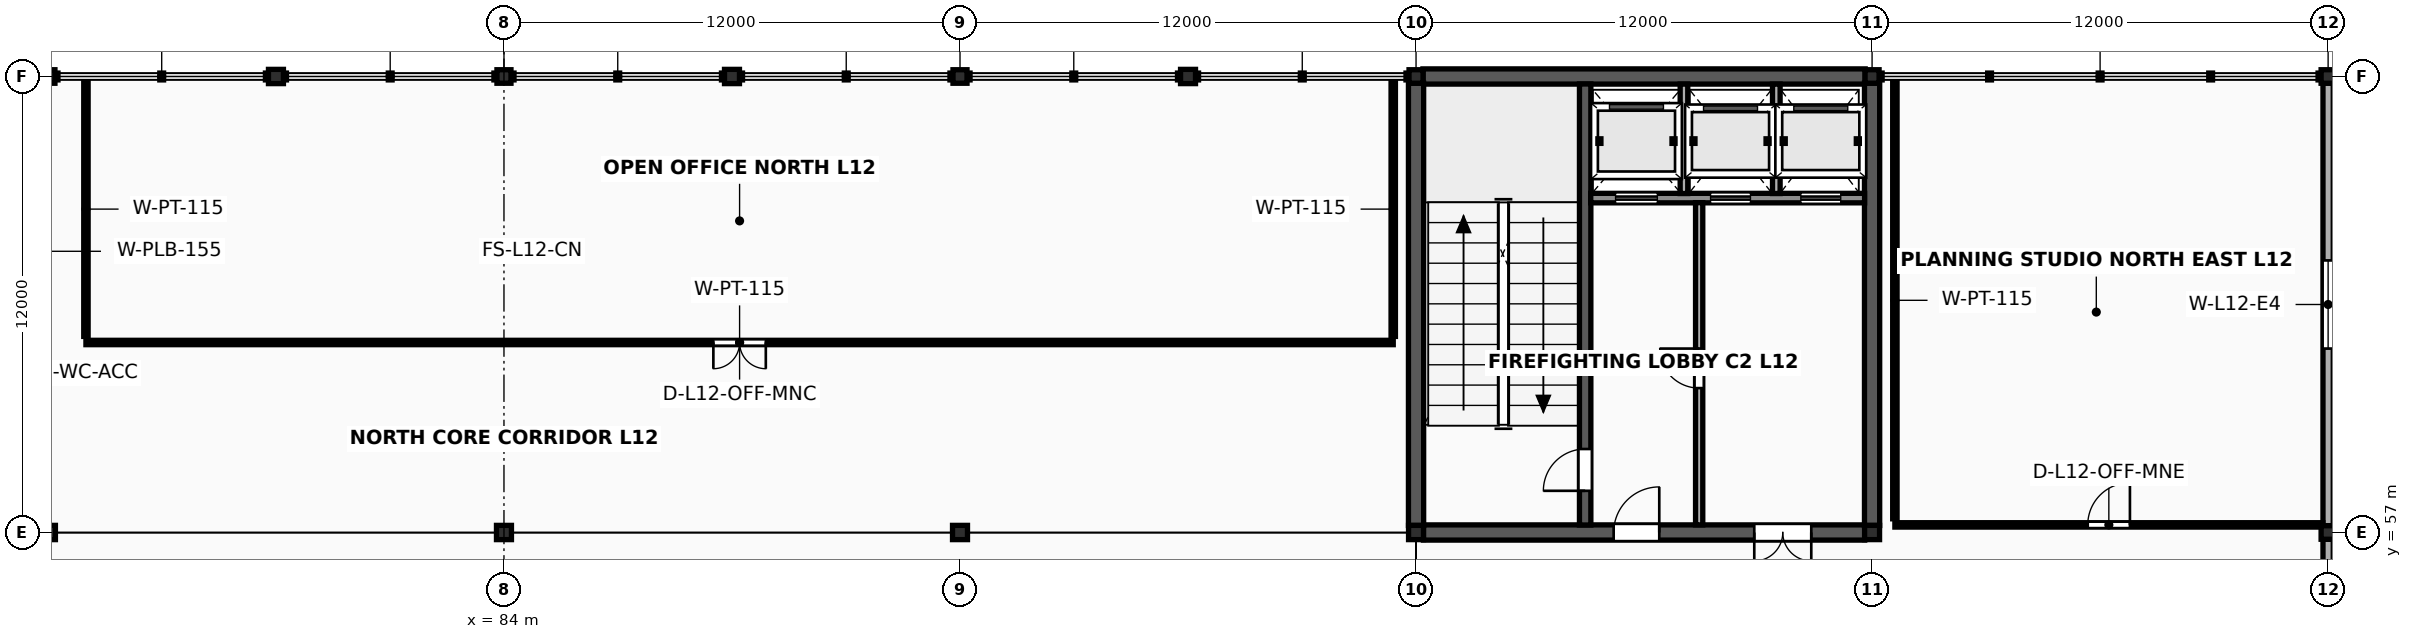
"""IFC4 building model, lengths in metres.
Left out: names, types, materials, properties, quantities, classifications, styles, units other than length and angle.
Written with IfcOpenShell. Run it as: python <this file> out.ifc"""

import sys

from ifc_helpers import new_model, si_unit, direction, frame, frame_2d, origin, origin_2d, place, context, subcontext, project, spatial, rectangle, i_section, extrude, element, fill, save


model = new_model("IFC4")
c1 = context("Model", 3, precision=1e-05, world=origin(), true_north=direction((0.0, 1.0)))
c2 = subcontext(c1, "Body", "Model", "MODEL_VIEW")
j1 = project(units=[si_unit("LENGTHUNIT", "METRE"), si_unit("PLANEANGLEUNIT", "RADIAN")], contexts=[c1])
p1 = place(None, origin())
s1 = spatial("IfcSite", under=j1, at=p1, CompositionType="ELEMENT")
p2 = place(p1, origin())
s2 = spatial("IfcBuilding", under=s1, at=p2, CompositionType="ELEMENT")
p3 = place(p2, frame((0.0, 0.0, 49.6)))
s3 = spatial("IfcBuildingStorey", under=s2, at=p3, CompositionType="ELEMENT", Elevation=49.6)
p4 = place(p3, frame((72.0, 57.0, 0.0), z_axis=(0.0, 0.0, 1.0), x_axis=(1.0, 0.0, 0.0)))
e1 = element("IfcColumn", 1, at=p4, inside=s3, PredefinedType="COLUMN", context=c2, shape_type="SweptSolid", body=[
    extrude(i_section(OverallWidth=0.394, OverallDepth=0.375, WebThickness=0.017, FlangeThickness=0.028, FilletRadius=0.018, at=origin_2d()), origin(), (0.0, 0.0, 1.0), 4.0),
])
p5 = place(p3, frame((72.0, 69.0, 0.0), z_axis=(0.0, 0.0, 1.0), x_axis=(1.0, 0.0, 0.0)))
e2 = element("IfcColumn", 2, at=p5, inside=s3, PredefinedType="COLUMN", context=c2, shape_type="SweptSolid", body=[
    extrude(i_section(OverallWidth=0.369, OverallDepth=0.356, WebThickness=0.011, FlangeThickness=0.018, FilletRadius=0.018, at=origin_2d()), origin(), (0.0, 0.0, 1.0), 4.0),
])
p6 = place(p3, frame((84.0, 57.0, 0.0), z_axis=(0.0, 0.0, 1.0), x_axis=(1.0, 0.0, 0.0)))
e3 = element("IfcColumn", 3, at=p6, inside=s3, PredefinedType="COLUMN", context=c2, shape_type="SweptSolid", body=[
    extrude(i_section(OverallWidth=0.394, OverallDepth=0.375, WebThickness=0.017, FlangeThickness=0.028, FilletRadius=0.018, at=origin_2d()), origin(), (0.0, 0.0, 1.0), 4.0),
])
p7 = place(p3, frame((84.0, 69.0, 0.0), z_axis=(0.0, 0.0, 1.0), x_axis=(1.0, 0.0, 0.0)))
e4 = element("IfcColumn", 4, at=p7, inside=s3, PredefinedType="COLUMN", context=c2, shape_type="SweptSolid", body=[
    extrude(i_section(OverallWidth=0.369, OverallDepth=0.356, WebThickness=0.011, FlangeThickness=0.018, FilletRadius=0.018, at=origin_2d()), origin(), (0.0, 0.0, 1.0), 4.0),
])
p8 = place(p3, frame((96.0, 57.0, 0.0), z_axis=(0.0, 0.0, 1.0), x_axis=(1.0, 0.0, 0.0)))
e5 = element("IfcColumn", 5, at=p8, inside=s3, PredefinedType="COLUMN", context=c2, shape_type="SweptSolid", body=[
    extrude(i_section(OverallWidth=0.394, OverallDepth=0.375, WebThickness=0.017, FlangeThickness=0.028, FilletRadius=0.018, at=origin_2d()), origin(), (0.0, 0.0, 1.0), 4.0),
])
p9 = place(p3, frame((96.0, 69.0, 0.0), z_axis=(0.0, 0.0, 1.0), x_axis=(1.0, 0.0, 0.0)))
e6 = element("IfcColumn", 6, at=p9, inside=s3, PredefinedType="COLUMN", context=c2, shape_type="SweptSolid", body=[
    extrude(i_section(OverallWidth=0.369, OverallDepth=0.356, WebThickness=0.011, FlangeThickness=0.018, FilletRadius=0.018, at=origin_2d()), origin(), (0.0, 0.0, 1.0), 4.0),
])
p10 = place(p3, frame((108.0, 57.0, 0.0), z_axis=(0.0, 0.0, 1.0), x_axis=(1.0, 0.0, 0.0)))
e7 = element("IfcColumn", 7, at=p10, inside=s3, PredefinedType="COLUMN", context=c2, shape_type="SweptSolid", body=[
    extrude(i_section(OverallWidth=0.394, OverallDepth=0.375, WebThickness=0.017, FlangeThickness=0.028, FilletRadius=0.018, at=origin_2d()), origin(), (0.0, 0.0, 1.0), 4.0),
])
p11 = place(p3, frame((108.0, 69.0, 0.0), z_axis=(0.0, 0.0, 1.0), x_axis=(1.0, 0.0, 0.0)))
e8 = element("IfcColumn", 8, at=p11, inside=s3, PredefinedType="COLUMN", context=c2, shape_type="SweptSolid", body=[
    extrude(i_section(OverallWidth=0.369, OverallDepth=0.356, WebThickness=0.011, FlangeThickness=0.018, FilletRadius=0.018, at=origin_2d()), origin(), (0.0, 0.0, 1.0), 4.0),
])
p12 = place(p3, frame((120.0, 57.0, 0.0), z_axis=(0.0, 0.0, 1.0), x_axis=(1.0, 0.0, 0.0)))
e9 = element("IfcColumn", 9, at=p12, inside=s3, PredefinedType="COLUMN", context=c2, shape_type="SweptSolid", body=[
    extrude(i_section(OverallWidth=0.394, OverallDepth=0.375, WebThickness=0.017, FlangeThickness=0.028, FilletRadius=0.018, at=origin_2d()), origin(), (0.0, 0.0, 1.0), 4.0),
])
for number, where, z_axis, x_axis in (
    (10, (120.0, 69.0, 0.0), (0.0, 0.0, 1.0), (1.0, 0.0, 0.0)),
    (11, (132.0, 57.0, 0.0), (0.0, 0.0, 1.0), (1.0, 0.0, 0.0)),
    (12, (132.0, 69.0, 0.0), (0.0, 0.0, 1.0), (1.0, 0.0, 0.0)),
):
    element("IfcColumn", number, at=place(p3, frame(where, z_axis=z_axis, x_axis=x_axis)), inside=s3, PredefinedType="COLUMN", context=c2, shape_type="SweptSolid", body=[
        extrude(i_section(OverallWidth=0.369, OverallDepth=0.356, WebThickness=0.011, FlangeThickness=0.018, FilletRadius=0.018, at=origin_2d()), origin(), (0.0, 0.0, 1.0), 4.0),
    ])
for number, where, z_axis, x_axis in (
    (13, (78.0, 69.0, 0.0), (0.0, 0.0, 1.0), (1.0, 0.0, 0.0)),
    (14, (90.0, 69.0, 0.0), (0.0, 0.0, 1.0), (1.0, 0.0, 0.0)),
    (15, (102.0, 69.0, 0.0), (0.0, 0.0, 1.0), (1.0, 0.0, 0.0)),
):
    element("IfcColumn", number, at=place(p3, frame(where, z_axis=z_axis, x_axis=x_axis)), inside=s3, PredefinedType="COLUMN", context=c2, shape_type="SweptSolid", body=[
        extrude(i_section(OverallWidth=0.394, OverallDepth=0.375, WebThickness=0.017, FlangeThickness=0.028, FilletRadius=0.018, at=origin_2d()), origin(), (0.0, 0.0, 1.0), 4.0),
    ])
p13 = place(p3, frame((108.194, 57.0, 0.0), z_axis=(0.0, 0.0, 1.0), x_axis=(1.0, 0.0, 0.0)))
e16 = element("IfcWall", 16, at=p13, inside=s3, PredefinedType="SHEAR", context=c2, shape_type="SweptSolid", body=[
    extrude(rectangle(XDim=11.612, YDim=0.4, at=frame_2d((5.806, 0.0))), origin(), (0.0, 0.0, 1.0), 3.848),
])
p14 = place(p13, frame((5.006, 0.0, 0.0)))
e17 = element("IfcOpeningElement", 17, at=p14, cuts=e16, PredefinedType="OPENING", context=c2, shape_type="SweptSolid", body=[
    extrude(rectangle(XDim=1.2, YDim=2.2, at=frame_2d((0.6, 1.1))), frame((0.0, 0.215, 0.0), z_axis=(0.0, -1.0, 0.0), x_axis=(1.0, 0.0, 0.0)), (0.0, 0.0, 1.0), 0.43),
])
p15 = place(p13, frame((8.706, 0.0, 0.0)))
e18 = element("IfcOpeningElement", 18, at=p15, cuts=e16, PredefinedType="OPENING", context=c2, shape_type="SweptSolid", body=[
    extrude(rectangle(XDim=1.5, YDim=2.25, at=frame_2d((0.75, 1.125))), frame((0.0, 0.215, 0.0), z_axis=(0.0, -1.0, 0.0), x_axis=(1.0, 0.0, 0.0)), (0.0, 0.0, 1.0), 0.43),
])
p16 = place(p3, frame((108.181, 69.0, 0.0), z_axis=(0.0, 0.0, 1.0), x_axis=(1.0, 0.0, 0.0)))
e19 = element("IfcWall", 19, at=p16, inside=s3, PredefinedType="SHEAR", context=c2, shape_type="SweptSolid", body=[
    extrude(rectangle(XDim=11.637, YDim=0.4, at=frame_2d((5.819, 0.0))), origin(), (0.0, 0.0, 1.0), 3.848),
])
for number, where, z_axis, x_axis in (
    (20, (108.0, 57.185, 0.0), (0.0, 0.0, 1.0), (0.0, 1.0, 0.0)),
    (21, (120.0, 57.185, 0.0), (0.0, 0.0, 1.0), (0.0, 1.0, 0.0)),
):
    element("IfcWall", number, at=place(p3, frame(where, z_axis=z_axis, x_axis=x_axis)), inside=s3, PredefinedType="SHEAR", context=c2, shape_type="SweptSolid", body=[
        extrude(rectangle(XDim=11.64, YDim=0.4, at=frame_2d((5.82, 0.0))), origin(), (0.0, 0.0, 1.0), 3.848),
    ])
p17 = place(p3, frame((112.45, 57.197, 0.0), z_axis=(0.0, 0.0, 1.0), x_axis=(0.0, 1.0, 0.0)))
e22 = element("IfcWall", 22, at=p17, inside=s3, PredefinedType="SHEAR", context=c2, shape_type="SweptSolid", body=[
    extrude(rectangle(XDim=11.606, YDim=0.3, at=frame_2d((5.803, 0.0))), origin(), (0.0, 0.0, 1.0), 3.848),
])
p18 = place(p17, frame((0.9, 0.0, 0.0)))
e23 = element("IfcOpeningElement", 23, at=p18, cuts=e22, PredefinedType="OPENING", context=c2, shape_type="SweptSolid", body=[
    extrude(rectangle(XDim=1.1, YDim=2.2, at=frame_2d((0.55, 1.1))), frame((0.0, 0.165, 0.0), z_axis=(0.0, -1.0, 0.0), x_axis=(1.0, 0.0, 0.0)), (0.0, 0.0, 1.0), 0.33),
])
p19 = place(p3, frame((112.597, 65.8, 0.0), z_axis=(0.0, 0.0, 1.0), x_axis=(1.0, 0.0, 0.0)))
e24 = element("IfcWall", 24, at=p19, inside=s3, PredefinedType="SOLIDWALL", context=c2, shape_type="SweptSolid", body=[
    extrude(rectangle(XDim=7.206, YDim=0.25, at=frame_2d((3.603, 0.0))), origin(), (0.0, 0.0, 1.0), 3.848),
])
p20 = place(p19, frame((0.653, 0.0, 0.0)))
e25 = element("IfcOpeningElement", 25, at=p20, cuts=e24, PredefinedType="OPENING", context=c2, shape_type="SweptSolid", body=[
    extrude(rectangle(XDim=1.1, YDim=2.24, at=frame_2d((0.55, 1.12))), frame((0.0, 0.14, 0.0), z_axis=(0.0, -1.0, 0.0), x_axis=(1.0, 0.0, 0.0)), (0.0, 0.0, 1.0), 0.28),
])
p21 = place(p19, frame((3.153, 0.0, 0.0)))
e26 = element("IfcOpeningElement", 26, at=p21, cuts=e24, PredefinedType="OPENING", context=c2, shape_type="SweptSolid", body=[
    extrude(rectangle(XDim=1.05, YDim=2.2, at=frame_2d((0.525, 1.1))), frame((0.0, 0.14, 0.0), z_axis=(0.0, -1.0, 0.0), x_axis=(1.0, 0.0, 0.0)), (0.0, 0.0, 1.0), 0.28),
])
p22 = place(p19, frame((5.528, 0.0, 0.0)))
e27 = element("IfcOpeningElement", 27, at=p22, cuts=e24, PredefinedType="OPENING", context=c2, shape_type="SweptSolid", body=[
    extrude(rectangle(XDim=1.05, YDim=2.2, at=frame_2d((0.525, 1.1))), frame((0.0, 0.14, 0.0), z_axis=(0.0, -1.0, 0.0), x_axis=(1.0, 0.0, 0.0)), (0.0, 0.0, 1.0), 0.28),
])
for number, where, z_axis, x_axis in (
    (28, (115.05, 65.92, 0.0), (0.0, 0.0, 1.0), (0.0, 1.0, 0.0)),
    (29, (117.48, 65.92, 0.0), (0.0, 0.0, 1.0), (0.0, 1.0, 0.0)),
):
    element("IfcWall", number, at=place(p3, frame(where, z_axis=z_axis, x_axis=x_axis)), inside=s3, PredefinedType="SOLIDWALL", context=c2, shape_type="SweptSolid", body=[
        extrude(rectangle(XDim=2.88, YDim=0.2, at=frame_2d((1.44, 0.0))), origin(), (0.0, 0.0, 1.0), 3.838),
    ])
p23 = place(p3, frame((115.45, 57.2, 0.0), z_axis=(0.0, 0.0, 1.0), x_axis=(0.0, 1.0, 0.0)))
e30 = element("IfcWall", 30, at=p23, inside=s3, PredefinedType="SOLIDWALL", context=c2, shape_type="SweptSolid", body=[
    extrude(rectangle(XDim=8.48, YDim=0.19, at=frame_2d((4.24, 0.0))), origin(), (0.0, 0.0, 1.0), 3.838),
])
p24 = place(p23, frame((3.6, 0.0, 0.0)))
e31 = element("IfcOpeningElement", 31, at=p24, cuts=e30, PredefinedType="OPENING", context=c2, shape_type="SweptSolid", body=[
    extrude(rectangle(XDim=1.04, YDim=2.18, at=frame_2d((0.52, 1.09))), frame((0.0, 0.11, 0.0), z_axis=(0.0, -1.0, 0.0), x_axis=(1.0, 0.0, 0.0)), (0.0, 0.0, 1.0), 0.22),
])
p25 = place(p3, frame((132.0, 45.176, 0.0), z_axis=(0.0, 0.0, 1.0), x_axis=(0.0, 1.0, 0.0)))
e32 = element("IfcWall", 32, at=p25, inside=s3, PredefinedType="SOLIDWALL", context=c2, shape_type="SweptSolid", body=[
    extrude(rectangle(XDim=11.648, YDim=0.27, at=frame_2d((5.824, 0.0))), origin(), (0.0, 0.0, 1.0), 3.301),
])
p26 = place(p25, frame((4.744, 0.0, 0.78)))
e33 = element("IfcOpeningElement", 33, at=p26, cuts=e32, PredefinedType="OPENING", context=c2, shape_type="SweptSolid", body=[
    extrude(rectangle(XDim=2.16, YDim=1.42, at=frame_2d((1.08, 0.71))), frame((0.0, 0.15, 0.0), z_axis=(0.0, -1.0, 0.0), x_axis=(1.0, 0.0, 0.0)), (0.0, 0.0, 1.0), 0.3),
])
p27 = place(p3, frame((132.0, 57.176, 0.0), z_axis=(0.0, 0.0, 1.0), x_axis=(0.0, 1.0, 0.0)))
e34 = element("IfcWall", 34, at=p27, inside=s3, PredefinedType="SOLIDWALL", context=c2, shape_type="SweptSolid", body=[
    extrude(rectangle(XDim=11.648, YDim=0.27, at=frame_2d((5.824, 0.0))), origin(), (0.0, 0.0, 1.0), 3.301),
])
p28 = place(p27, frame((4.664, 0.0, 0.78)))
e35 = element("IfcOpeningElement", 35, at=p28, cuts=e34, PredefinedType="OPENING", context=c2, shape_type="SweptSolid", body=[
    extrude(rectangle(XDim=2.32, YDim=1.42, at=frame_2d((1.16, 0.71))), frame((0.0, 0.15, 0.0), z_axis=(0.0, -1.0, 0.0), x_axis=(1.0, 0.0, 0.0)), (0.0, 0.0, 1.0), 0.3),
])
p29 = place(p3, frame((73.0, 62.0, 0.0), z_axis=(0.0, 0.0, 1.0), x_axis=(1.0, 0.0, 0.0)))
e36 = element("IfcWall", 36, at=p29, inside=s3, PredefinedType="PARTITIONING", context=c2, shape_type="SweptSolid", body=[
    extrude(rectangle(XDim=34.4, YDim=0.115, at=frame_2d((17.2, 0.0))), origin(), (0.0, 0.0, 1.0), 2.88),
])
p30 = place(p29, frame((16.51, 0.0, 0.0)))
e37 = element("IfcOpeningElement", 37, at=p30, cuts=e36, PredefinedType="OPENING", context=c2, shape_type="SweptSolid", body=[
    extrude(rectangle(XDim=1.38, YDim=2.23, at=frame_2d((0.69, 1.115))), frame((0.0, 0.073, 0.0), z_axis=(0.0, -1.0, 0.0), x_axis=(1.0, 0.0, 0.0)), (0.0, 0.0, 1.0), 0.145),
])
for number, where, z_axis, x_axis in (
    (38, (73.0, 62.16, 0.0), (0.0, 0.0, 1.0), (0.0, 1.0, 0.0)),
    (39, (107.4, 62.16, 0.0), (0.0, 0.0, 1.0), (0.0, 1.0, 0.0)),
):
    element("IfcWall", number, at=place(p3, frame(where, z_axis=z_axis, x_axis=x_axis)), inside=s3, PredefinedType="PARTITIONING", context=c2, shape_type="SweptSolid", body=[
        extrude(rectangle(XDim=6.7, YDim=0.115, at=frame_2d((3.35, 0.0))), origin(), (0.0, 0.0, 1.0), 2.88),
    ])
p31 = place(p3, frame((120.6, 57.2, 0.0), z_axis=(0.0, 0.0, 1.0), x_axis=(1.0, 0.0, 0.0)))
e40 = element("IfcWall", 40, at=p31, inside=s3, PredefinedType="PARTITIONING", context=c2, shape_type="SweptSolid", body=[
    extrude(rectangle(XDim=11.26, YDim=0.115, at=frame_2d((5.63, 0.0))), origin(), (0.0, 0.0, 1.0), 2.88),
])
p32 = place(p31, frame((5.075, 0.0, 0.0)))
e41 = element("IfcOpeningElement", 41, at=p32, cuts=e40, PredefinedType="OPENING", context=c2, shape_type="SweptSolid", body=[
    extrude(rectangle(XDim=1.11, YDim=2.21, at=frame_2d((0.555, 1.105))), frame((0.0, 0.073, 0.0), z_axis=(0.0, -1.0, 0.0), x_axis=(1.0, 0.0, 0.0)), (0.0, 0.0, 1.0), 0.145),
])
p33 = place(p3, frame((120.6, 57.36, 0.0), z_axis=(0.0, 0.0, 1.0), x_axis=(0.0, 1.0, 0.0)))
e42 = element("IfcWall", 42, at=p33, inside=s3, PredefinedType="PARTITIONING", context=c2, shape_type="SweptSolid", body=[
    extrude(rectangle(XDim=11.5, YDim=0.115, at=frame_2d((5.75, 0.0))), origin(), (0.0, 0.0, 1.0), 2.88),
])
p34 = place(p28, origin())
e43 = element("IfcWindow", 43, at=p34, inside=s3, PartitioningType="DOUBLE_PANEL_VERTICAL", PredefinedType="WINDOW", context=c2, shape_type="SweptSolid", body=[
    extrude(rectangle(XDim=2.32, YDim=1.42, at=frame_2d((1.16, 0.71))), frame((0.0, 0.03, 0.0), z_axis=(0.0, -1.0, 0.0), x_axis=(1.0, 0.0, 0.0)), (0.0, 0.0, 1.0), 0.06),
])
fill(e35, e43)
p35 = place(p18, origin())
e44 = element("IfcDoor", 44, at=p35, inside=s3, OperationType="SINGLE_SWING_LEFT", PredefinedType="DOOR", context=c2, shape_type="SweptSolid", body=[
    extrude(rectangle(XDim=1.1, YDim=2.2, at=frame_2d((0.55, 1.1))), frame((0.0, 0.025, 0.0), z_axis=(0.0, -1.0, 0.0), x_axis=(1.0, 0.0, 0.0)), (0.0, 0.0, 1.0), 0.05),
])
fill(e23, e44)
p36 = place(p24, origin())
e45 = element("IfcDoor", 45, at=p36, inside=s3, OperationType="SINGLE_SWING_RIGHT", PredefinedType="DOOR", context=c2, shape_type="SweptSolid", body=[
    extrude(rectangle(XDim=1.04, YDim=2.18, at=frame_2d((0.52, 1.09))), frame((0.0, 0.025, 0.0), z_axis=(0.0, -1.0, 0.0), x_axis=(1.0, 0.0, 0.0)), (0.0, 0.0, 1.0), 0.05),
])
fill(e31, e45)
p37 = place(p14, origin())
e46 = element("IfcDoor", 46, at=p37, inside=s3, OperationType="SINGLE_SWING_RIGHT", PredefinedType="DOOR", context=c2, shape_type="SweptSolid", body=[
    extrude(rectangle(XDim=1.2, YDim=2.2, at=frame_2d((0.6, 1.1))), frame((0.0, 0.025, 0.0), z_axis=(0.0, -1.0, 0.0), x_axis=(1.0, 0.0, 0.0)), (0.0, 0.0, 1.0), 0.05),
])
fill(e17, e46)
p38 = place(p15, origin())
e47 = element("IfcDoor", 47, at=p38, inside=s3, OperationType="DOUBLE_DOOR_SINGLE_SWING", PredefinedType="DOOR", context=c2, shape_type="SweptSolid", body=[
    extrude(rectangle(XDim=1.5, YDim=2.25, at=frame_2d((0.75, 1.125))), frame((0.0, 0.025, 0.0), z_axis=(0.0, -1.0, 0.0), x_axis=(1.0, 0.0, 0.0)), (0.0, 0.0, 1.0), 0.05),
])
fill(e18, e47)
p39 = place(p20, origin())
e48 = element("IfcDoor", 48, at=p39, inside=s3, OperationType="SLIDING_TO_LEFT", PredefinedType="USERDEFINED", context=c2, shape_type="SweptSolid", body=[
    extrude(rectangle(XDim=1.1, YDim=2.24, at=frame_2d((0.55, 1.12))), frame((0.0, 0.025, 0.0), z_axis=(0.0, -1.0, 0.0), x_axis=(1.0, 0.0, 0.0)), (0.0, 0.0, 1.0), 0.05),
])
fill(e25, e48)
p40 = place(p21, origin())
e49 = element("IfcDoor", 49, at=p40, inside=s3, OperationType="SLIDING_TO_LEFT", PredefinedType="USERDEFINED", context=c2, shape_type="SweptSolid", body=[
    extrude(rectangle(XDim=1.05, YDim=2.2, at=frame_2d((0.525, 1.1))), frame((0.0, 0.025, 0.0), z_axis=(0.0, -1.0, 0.0), x_axis=(1.0, 0.0, 0.0)), (0.0, 0.0, 1.0), 0.05),
])
fill(e26, e49)
p41 = place(p22, origin())
e50 = element("IfcDoor", 50, at=p41, inside=s3, OperationType="SLIDING_TO_LEFT", PredefinedType="USERDEFINED", context=c2, shape_type="SweptSolid", body=[
    extrude(rectangle(XDim=1.05, YDim=2.2, at=frame_2d((0.525, 1.1))), frame((0.0, 0.025, 0.0), z_axis=(0.0, -1.0, 0.0), x_axis=(1.0, 0.0, 0.0)), (0.0, 0.0, 1.0), 0.05),
])
fill(e27, e50)
p42 = place(p30, origin())
e51 = element("IfcDoor", 51, at=p42, inside=s3, OperationType="DOUBLE_DOOR_SINGLE_SWING", PredefinedType="DOOR", context=c2, shape_type="SweptSolid", body=[
    extrude(rectangle(XDim=1.38, YDim=2.23, at=frame_2d((0.69, 1.115))), frame((0.0, 0.025, 0.0), z_axis=(0.0, -1.0, 0.0), x_axis=(1.0, 0.0, 0.0)), (0.0, 0.0, 1.0), 0.05),
])
fill(e37, e51)
p43 = place(p32, origin())
e52 = element("IfcDoor", 52, at=p43, inside=s3, OperationType="SINGLE_SWING_RIGHT", PredefinedType="DOOR", context=c2, shape_type="SweptSolid", body=[
    extrude(rectangle(XDim=1.11, YDim=2.21, at=frame_2d((0.555, 1.105))), frame((0.0, 0.025, 0.0), z_axis=(0.0, -1.0, 0.0), x_axis=(1.0, 0.0, 0.0)), (0.0, 0.0, 1.0), 0.05),
])
fill(e41, e52)
save(model, sys.argv[1])
